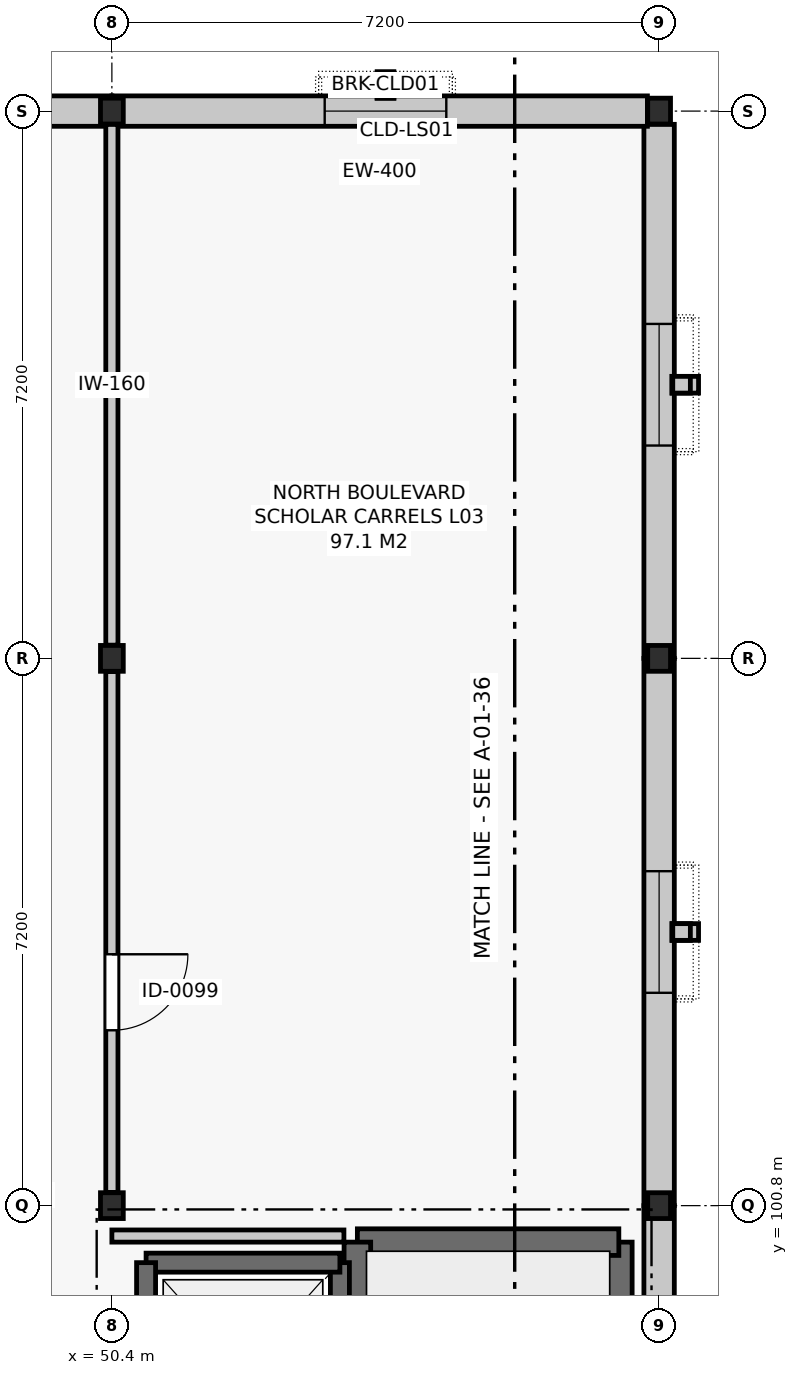
"""IFC4 building model, lengths in metres.
Left out: names, types, materials, properties, quantities, classifications, styles, units other than length and angle.
Written with IfcOpenShell. Run it as: python <this file> out.ifc"""

import sys

from ifc_helpers import new_model, si_unit, direction, frame, frame_2d, origin, origin_2d, place, context, subcontext, project, spatial, rectangle, i_section, extrude, element, fill, save


model = new_model("IFC4")
c1 = context("Model", 3, precision=1e-05, world=origin(), true_north=direction((0.0, 1.0)))
c2 = subcontext(c1, "Body", "Model", "MODEL_VIEW")
j1 = project(units=[si_unit("LENGTHUNIT", "METRE"), si_unit("PLANEANGLEUNIT", "RADIAN")], contexts=[c1])
p1 = place(None, origin())
s1 = spatial("IfcSite", under=j1, at=p1, CompositionType="ELEMENT")
p2 = place(p1, origin())
s2 = spatial("IfcBuilding", under=s1, at=p2, CompositionType="ELEMENT")
p3 = place(p2, frame((0.0, 0.0, 14.4)))
s3 = spatial("IfcBuildingStorey", under=s2, at=p3, CompositionType="ELEMENT", Elevation=14.4)
for number, where, z_axis, x_axis in (
    (1, (50.4, 100.8, 0.0), (0.0, 0.0, 1.0), (1.0, 0.0, 0.0)),
    (2, (50.4, 108.0, 0.0), (0.0, 0.0, 1.0), (1.0, 0.0, 0.0)),
    (3, (50.4, 115.2, 0.0), (0.0, 0.0, 1.0), (1.0, 0.0, 0.0)),
    (4, (57.6, 100.8, 0.0), (0.0, 0.0, 1.0), (1.0, 0.0, 0.0)),
    (5, (57.6, 108.0, 0.0), (0.0, 0.0, 1.0), (1.0, 0.0, 0.0)),
    (6, (57.6, 115.2, 0.0), (0.0, 0.0, 1.0), (1.0, 0.0, 0.0)),
):
    element("IfcColumn", number, at=place(p3, frame(where, z_axis=z_axis, x_axis=x_axis)), inside=s3, PredefinedType="COLUMN", context=c2, shape_type="SweptSolid", body=[
        extrude(i_section(OverallWidth=0.3, OverallDepth=0.34, WebThickness=0.012, FlangeThickness=0.021, FilletRadius=0.027, at=origin_2d()), origin(), (0.0, 0.0, 1.0), 4.2),
    ])
p4 = place(p3, frame((57.6, 93.6, 0.0), z_axis=(0.0, 0.0, 1.0), x_axis=(0.0, 1.0, 0.0)))
e7 = element("IfcWall", 7, at=p4, inside=s3, PredefinedType="SOLIDWALL", context=c2, shape_type="SweptSolid", body=[
    extrude(rectangle(XDim=7.2, YDim=0.4, at=frame_2d((3.6, 0.0))), origin(), (0.0, 0.0, 1.0), 3.22),
])
p5 = place(p4, frame((2.8, 0.0, 0.95)))
e8 = element("IfcOpeningElement", 8, at=p5, cuts=e7, PredefinedType="OPENING", context=c2, shape_type="SweptSolid", body=[
    extrude(rectangle(XDim=1.6, YDim=2.2, at=frame_2d((0.8, 1.1))), frame((0.0, 0.212, 0.0), z_axis=(0.0, -1.0, 0.0), x_axis=(1.0, 0.0, 0.0)), (0.0, 0.0, 1.0), 0.424),
])
p6 = place(p3, frame((57.6, 100.8, 0.0), z_axis=(0.0, 0.0, 1.0), x_axis=(0.0, 1.0, 0.0)))
e9 = element("IfcWall", 9, at=p6, inside=s3, PredefinedType="SOLIDWALL", context=c2, shape_type="SweptSolid", body=[
    extrude(rectangle(XDim=7.2, YDim=0.4, at=frame_2d((3.6, 0.0))), origin(), (0.0, 0.0, 1.0), 3.22),
])
p7 = place(p6, frame((2.8, 0.0, 0.95)))
e10 = element("IfcOpeningElement", 10, at=p7, cuts=e9, PredefinedType="OPENING", context=c2, shape_type="SweptSolid", body=[
    extrude(rectangle(XDim=1.6, YDim=2.2, at=frame_2d((0.8, 1.1))), frame((0.0, 0.212, 0.0), z_axis=(0.0, -1.0, 0.0), x_axis=(1.0, 0.0, 0.0)), (0.0, 0.0, 1.0), 0.424),
])
p8 = place(p3, frame((57.6, 108.0, 0.0), z_axis=(0.0, 0.0, 1.0), x_axis=(0.0, 1.0, 0.0)))
e11 = element("IfcWall", 11, at=p8, inside=s3, PredefinedType="SOLIDWALL", context=c2, shape_type="SweptSolid", body=[
    extrude(rectangle(XDim=7.026, YDim=0.4, at=frame_2d((3.513, 0.0))), origin(), (0.0, 0.0, 1.0), 3.22),
])
p9 = place(p8, frame((2.8, 0.0, 0.95)))
e12 = element("IfcOpeningElement", 12, at=p9, cuts=e11, PredefinedType="OPENING", context=c2, shape_type="SweptSolid", body=[
    extrude(rectangle(XDim=1.6, YDim=2.2, at=frame_2d((0.8, 1.1))), frame((0.0, 0.212, 0.0), z_axis=(0.0, -1.0, 0.0), x_axis=(1.0, 0.0, 0.0)), (0.0, 0.0, 1.0), 0.424),
])
p10 = place(p3, frame((57.446, 115.2, 0.0), z_axis=(0.0, 0.0, 1.0), x_axis=(-1.0, 0.0, 0.0)))
e13 = element("IfcWall", 13, at=p10, inside=s3, PredefinedType="SOLIDWALL", context=c2, shape_type="SweptSolid", body=[
    extrude(rectangle(XDim=7.046, YDim=0.4, at=frame_2d((3.523, 0.0))), origin(), (0.0, 0.0, 1.0), 3.22),
])
p11 = place(p10, frame((2.646, 0.0, 0.95)))
e14 = element("IfcOpeningElement", 14, at=p11, cuts=e13, PredefinedType="OPENING", context=c2, shape_type="SweptSolid", body=[
    extrude(rectangle(XDim=1.6, YDim=2.2, at=frame_2d((0.8, 1.1))), frame((0.0, 0.212, 0.0), z_axis=(0.0, -1.0, 0.0), x_axis=(1.0, 0.0, 0.0)), (0.0, 0.0, 1.0), 0.424),
])
p12 = place(p3, frame((50.4, 115.2, 0.0), z_axis=(0.0, 0.0, 1.0), x_axis=(-1.0, 0.0, 0.0)))
e15 = element("IfcWall", 15, at=p12, inside=s3, PredefinedType="SOLIDWALL", context=c2, shape_type="SweptSolid", body=[
    extrude(rectangle(XDim=7.2, YDim=0.4, at=frame_2d((3.6, 0.0))), origin(), (0.0, 0.0, 1.0), 3.22),
])
p13 = place(p3, frame((57.07, 93.18, 0.0), z_axis=(0.0, 0.0, 1.0), x_axis=(0.0, 1.0, 0.0)))
e16 = element("IfcWall", 16, at=p13, inside=s3, PredefinedType="SHEAR", context=c2, shape_type="SweptSolid", body=[
    extrude(rectangle(XDim=7.14, YDim=0.35, at=frame_2d((3.57, 0.0))), origin(), (0.0, 0.0, 1.0), 3.94),
])
p14 = place(p3, frame((57.07, 100.32, 0.0), z_axis=(0.0, 0.0, 1.0), x_axis=(-1.0, 0.0, 0.0)))
e17 = element("IfcWall", 17, at=p14, inside=s3, PredefinedType="SHEAR", context=c2, shape_type="SweptSolid", body=[
    extrude(rectangle(XDim=3.44, YDim=0.35, at=frame_2d((1.72, 0.0))), origin(), (0.0, 0.0, 1.0), 3.94),
])
p15 = place(p3, frame((53.63, 100.32, 0.0), z_axis=(0.0, 0.0, 1.0), x_axis=(0.0, -1.0, 0.0)))
e18 = element("IfcWall", 18, at=p15, inside=s3, PredefinedType="SHEAR", context=c2, shape_type="SweptSolid", body=[
    extrude(rectangle(XDim=7.14, YDim=0.35, at=frame_2d((3.57, 0.0))), origin(), (0.0, 0.0, 1.0), 3.94),
])
p16 = place(p3, frame((53.4, 97.25, 0.0), z_axis=(0.0, 0.0, 1.0), x_axis=(0.0, 1.0, 0.0)))
e19 = element("IfcWall", 19, at=p16, inside=s3, PredefinedType="SHEAR", context=c2, shape_type="SweptSolid", body=[
    extrude(rectangle(XDim=2.8, YDim=0.25, at=frame_2d((1.4, 0.0))), origin(), (0.0, 0.0, 1.0), 3.94),
])
p17 = place(p3, frame((53.4, 100.05, 0.0), z_axis=(0.0, 0.0, 1.0), x_axis=(-1.0, 0.0, 0.0)))
e20 = element("IfcWall", 20, at=p17, inside=s3, PredefinedType="SHEAR", context=c2, shape_type="SweptSolid", body=[
    extrude(rectangle(XDim=2.55, YDim=0.25, at=frame_2d((1.275, 0.0))), origin(), (0.0, 0.0, 1.0), 3.94),
])
p18 = place(p3, frame((50.85, 100.05, 0.0), z_axis=(0.0, 0.0, 1.0), x_axis=(0.0, -1.0, 0.0)))
e21 = element("IfcWall", 21, at=p18, inside=s3, PredefinedType="SHEAR", context=c2, shape_type="SweptSolid", body=[
    extrude(rectangle(XDim=2.8, YDim=0.25, at=frame_2d((1.4, 0.0))), origin(), (0.0, 0.0, 1.0), 3.94),
])
p19 = place(p3, frame((50.4, 100.4, 0.0), z_axis=(0.0, 0.0, 1.0), x_axis=(1.0, 0.0, 0.0)))
e22 = element("IfcWall", 22, at=p19, inside=s3, PredefinedType="PARTITIONING", context=c2, shape_type="SweptSolid", body=[
    extrude(rectangle(XDim=3.053, YDim=0.16, at=frame_2d((1.526, 0.0))), origin(), (0.0, 0.0, 1.0), 3.575),
])
p20 = place(p3, frame((50.4, 100.974, 0.0), z_axis=(0.0, 0.0, 1.0), x_axis=(0.0, 1.0, 0.0)))
e23 = element("IfcWall", 23, at=p20, inside=s3, PredefinedType="PARTITIONING", context=c2, shape_type="SweptSolid", body=[
    extrude(rectangle(XDim=6.852, YDim=0.16, at=frame_2d((3.426, 0.0))), origin(), (0.0, 0.0, 1.0), 3.495),
])
p21 = place(p20, frame((2.133, 0.0, 0.0)))
e24 = element("IfcOpeningElement", 24, at=p21, cuts=e23, PredefinedType="OPENING", context=c2, shape_type="SweptSolid", body=[
    extrude(rectangle(XDim=1.0, YDim=2.15, at=frame_2d((0.5, 1.075))), frame((0.0, 0.092, 0.0), z_axis=(0.0, -1.0, 0.0), x_axis=(1.0, 0.0, 0.0)), (0.0, 0.0, 1.0), 0.184),
])
p22 = place(p3, frame((50.4, 108.174, 0.0), z_axis=(0.0, 0.0, 1.0), x_axis=(0.0, 1.0, 0.0)))
e25 = element("IfcWall", 25, at=p22, inside=s3, PredefinedType="PARTITIONING", context=c2, shape_type="SweptSolid", body=[
    extrude(rectangle(XDim=6.852, YDim=0.16, at=frame_2d((3.426, 0.0))), origin(), (0.0, 0.0, 1.0), 3.495),
])
p23 = place(p7, origin())
e26 = element("IfcWindow", 26, at=p23, inside=s3, PartitioningType="SINGLE_PANEL", PredefinedType="WINDOW", context=c2, shape_type="SweptSolid", body=[
    extrude(rectangle(XDim=1.6, YDim=2.2, at=frame_2d((0.8, 1.1))), frame((0.0, 0.03, 0.0), z_axis=(0.0, -1.0, 0.0), x_axis=(1.0, 0.0, 0.0)), (0.0, 0.0, 1.0), 0.06),
])
fill(e10, e26)
p24 = place(p9, origin())
e27 = element("IfcWindow", 27, at=p24, inside=s3, PartitioningType="SINGLE_PANEL", PredefinedType="WINDOW", context=c2, shape_type="SweptSolid", body=[
    extrude(rectangle(XDim=1.6, YDim=2.2, at=frame_2d((0.8, 1.1))), frame((0.0, 0.03, 0.0), z_axis=(0.0, -1.0, 0.0), x_axis=(1.0, 0.0, 0.0)), (0.0, 0.0, 1.0), 0.06),
])
fill(e12, e27)
p25 = place(p11, origin())
e28 = element("IfcWindow", 28, at=p25, inside=s3, PartitioningType="SINGLE_PANEL", PredefinedType="WINDOW", context=c2, shape_type="SweptSolid", body=[
    extrude(rectangle(XDim=1.6, YDim=2.2, at=frame_2d((0.8, 1.1))), frame((0.0, 0.03, 0.0), z_axis=(0.0, -1.0, 0.0), x_axis=(1.0, 0.0, 0.0)), (0.0, 0.0, 1.0), 0.06),
])
fill(e14, e28)
p26 = place(p21, frame((1.0, 0.0, 0.0), z_axis=(0.0, 0.0, 1.0), x_axis=(-1.0, 0.0, 0.0)))
e29 = element("IfcDoor", 29, at=p26, inside=s3, OperationType="SINGLE_SWING_LEFT", PredefinedType="DOOR", context=c2, shape_type="SweptSolid", body=[
    extrude(rectangle(XDim=1.0, YDim=2.15, at=frame_2d((0.5, 1.075))), frame((0.0, 0.025, 0.0), z_axis=(0.0, -1.0, 0.0), x_axis=(1.0, 0.0, 0.0)), (0.0, 0.0, 1.0), 0.05),
])
fill(e24, e29)
save(model, sys.argv[1])
